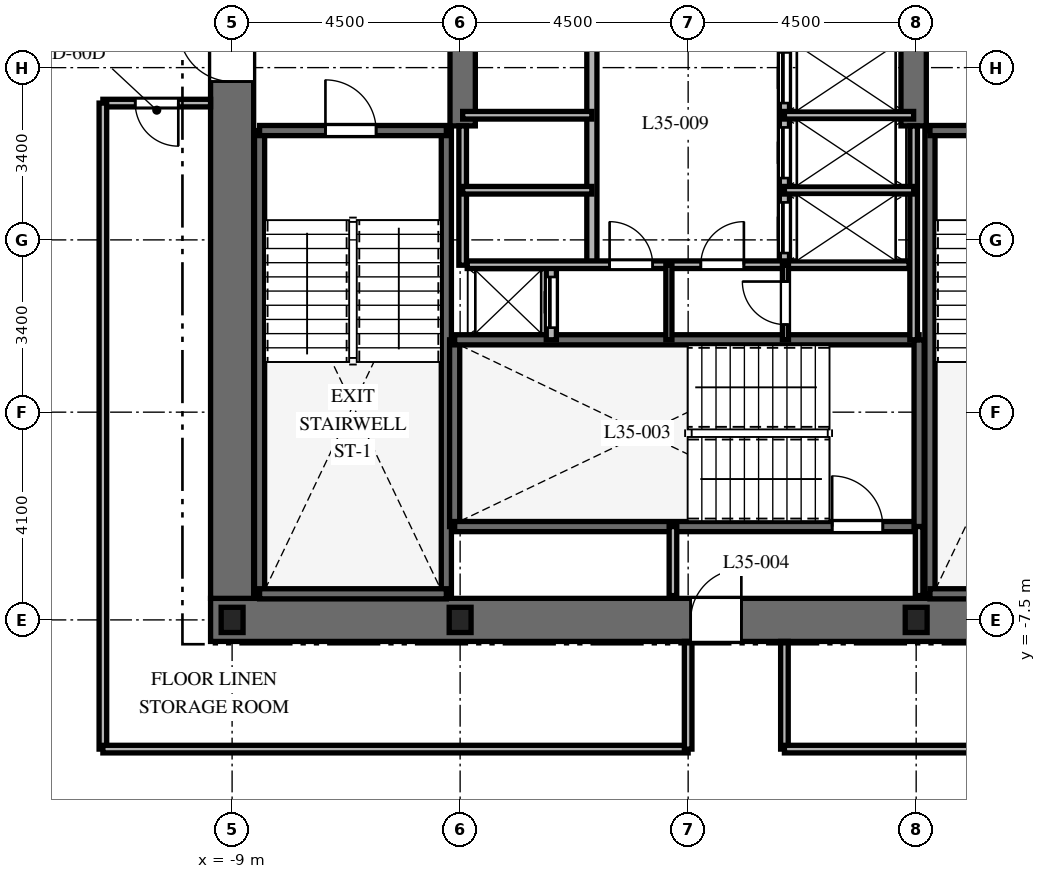
"""IFC4 building model, lengths in metres.
Left out: names, types, materials, properties, quantities, classifications, styles, units other than length and angle.
Written with IfcOpenShell. Run it as: python <this file> out.ifc"""

import sys

from ifc_helpers import new_model, si_unit, direction, frame, frame_2d, origin, origin_2d, place, context, subcontext, project, spatial, rectangle, i_section, extrude, element, fill, save


model = new_model("IFC4")
c1 = context("Model", 3, precision=1e-05, world=origin(), true_north=direction((0.0, 1.0)))
c2 = subcontext(c1, "Body", "Model", "MODEL_VIEW")
j1 = project(units=[si_unit("LENGTHUNIT", "METRE"), si_unit("PLANEANGLEUNIT", "RADIAN")], contexts=[c1])
p1 = place(None, origin())
s1 = spatial("IfcSite", under=j1, at=p1, CompositionType="ELEMENT")
p2 = place(p1, origin())
s2 = spatial("IfcBuilding", under=s1, at=p2, CompositionType="ELEMENT")
p3 = place(p2, frame((0.0, 0.0, 144.3)))
s3 = spatial("IfcBuildingStorey", under=s2, at=p3, CompositionType="ELEMENT", Elevation=144.3)
p4 = place(p3, frame((-9.425, -7.5, 0.0), z_axis=(0.0, 0.0, 1.0), x_axis=(1.0, 0.0, 0.0)))
e1 = element("IfcWall", 1, at=p4, inside=s3, PredefinedType="SHEAR", context=c2, shape_type="SweptSolid", body=[
    extrude(rectangle(XDim=18.85, YDim=0.85, at=frame_2d((9.425, 0.0))), origin(), (0.0, 0.0, 1.0), 3.7),
])
p5 = place(p4, frame((9.475, 0.0, 0.0)))
e2 = element("IfcOpeningElement", 2, at=p5, cuts=e1, PredefinedType="OPENING", context=c2, shape_type="SweptSolid", body=[
    extrude(rectangle(XDim=1.0, YDim=2.15, at=frame_2d((0.5, 1.075))), frame((0.0, 0.435, 0.0), z_axis=(0.0, -1.0, 0.0), x_axis=(1.0, 0.0, 0.0)), (0.0, 0.0, 1.0), 0.87),
])
p6 = place(p3, frame((-9.0, -7.075, 0.0), z_axis=(0.0, 0.0, 1.0), x_axis=(0.0, 1.0, 0.0)))
e3 = element("IfcWall", 3, at=p6, inside=s3, PredefinedType="SHEAR", context=c2, shape_type="SweptSolid", body=[
    extrude(rectangle(XDim=14.15, YDim=0.85, at=frame_2d((7.075, 0.0))), origin(), (0.0, 0.0, 1.0), 3.7),
])
p7 = place(p6, frame((10.2, 0.0, 0.0)))
e4 = element("IfcOpeningElement", 4, at=p7, cuts=e3, PredefinedType="OPENING", context=c2, shape_type="SweptSolid", body=[
    extrude(rectangle(XDim=1.05, YDim=2.15, at=frame_2d((0.525, 1.075))), frame((0.0, 0.435, 0.0), z_axis=(0.0, -1.0, 0.0), x_axis=(1.0, 0.0, 0.0)), (0.0, 0.0, 1.0), 0.87),
])
for number, where, z_axis, x_axis in (
    (5, (-4.45, 2.25, 0.0), (0.0, 0.0, 1.0), (0.0, 1.0, 0.0)),
    (6, (4.45, 2.25, 0.0), (0.0, 0.0, 1.0), (0.0, 1.0, 0.0)),
):
    element("IfcWall", number, at=place(p3, frame(where, z_axis=z_axis, x_axis=x_axis)), inside=s3, PredefinedType="SHEAR", context=c2, shape_type="SweptSolid", body=[
        extrude(rectangle(XDim=4.825, YDim=0.5, at=frame_2d((2.413, 0.0))), origin(), (0.0, 0.0, 1.0), 3.7),
    ])
for number, where, z_axis, x_axis in (
    (7, (-8.458, -6.985, 0.0), (0.0, 0.0, 1.0), (0.0, 1.0, 0.0)),
    (8, (-4.772, -6.985, 0.0), (0.0, 0.0, 1.0), (0.0, 1.0, 0.0)),
):
    element("IfcWall", number, at=place(p3, frame(where, z_axis=z_axis, x_axis=x_axis)), inside=s3, PredefinedType="SHEAR", context=c2, shape_type="SweptSolid", body=[
        extrude(rectangle(XDim=9.143, YDim=0.2, at=frame_2d((4.572, 0.0))), origin(), (0.0, 0.0, 1.0), 3.7),
    ])
p8 = place(p3, frame((-8.458, -6.985, 0.0), z_axis=(0.0, 0.0, 1.0), x_axis=(1.0, 0.0, 0.0)))
e9 = element("IfcWall", 9, at=p8, inside=s3, PredefinedType="SHEAR", context=c2, shape_type="SweptSolid", body=[
    extrude(rectangle(XDim=3.686, YDim=0.2, at=frame_2d((1.843, 0.0))), origin(), (0.0, 0.0, 1.0), 3.7),
])
p9 = place(p3, frame((-8.458, 2.158, 0.0), z_axis=(0.0, 0.0, 1.0), x_axis=(1.0, 0.0, 0.0)))
e10 = element("IfcWall", 10, at=p9, inside=s3, PredefinedType="SHEAR", context=c2, shape_type="SweptSolid", body=[
    extrude(rectangle(XDim=3.686, YDim=0.2, at=frame_2d((1.843, 0.0))), origin(), (0.0, 0.0, 1.0), 3.7),
])
p10 = place(p9, frame((1.3, 0.0, 0.0)))
e11 = element("IfcOpeningElement", 11, at=p10, cuts=e10, PredefinedType="OPENING", context=c2, shape_type="SweptSolid", body=[
    extrude(rectangle(XDim=1.0, YDim=2.15, at=frame_2d((0.5, 1.075))), frame((0.0, 0.11, 0.0), z_axis=(0.0, -1.0, 0.0), x_axis=(1.0, 0.0, 0.0)), (0.0, 0.0, 1.0), 0.22),
])
p11 = place(p3, frame((4.772, -6.985, 0.0), z_axis=(0.0, 0.0, 1.0), x_axis=(0.0, 1.0, 0.0)))
e12 = element("IfcWall", 12, at=p11, inside=s3, PredefinedType="SHEAR", context=c2, shape_type="SweptSolid", body=[
    extrude(rectangle(XDim=9.143, YDim=0.2, at=frame_2d((4.572, 0.0))), origin(), (0.0, 0.0, 1.0), 3.7),
])
p12 = place(p3, frame((4.772, -6.985, 0.0), z_axis=(0.0, 0.0, 1.0), x_axis=(1.0, 0.0, 0.0)))
e13 = element("IfcWall", 13, at=p12, inside=s3, PredefinedType="SHEAR", context=c2, shape_type="SweptSolid", body=[
    extrude(rectangle(XDim=3.686, YDim=0.2, at=frame_2d((1.843, 0.0))), origin(), (0.0, 0.0, 1.0), 3.7),
])
p13 = place(p3, frame((4.772, 2.158, 0.0), z_axis=(0.0, 0.0, 1.0), x_axis=(1.0, 0.0, 0.0)))
e14 = element("IfcWall", 14, at=p13, inside=s3, PredefinedType="SHEAR", context=c2, shape_type="SweptSolid", body=[
    extrude(rectangle(XDim=3.686, YDim=0.2, at=frame_2d((1.843, 0.0))), origin(), (0.0, 0.0, 1.0), 3.7),
])
p14 = place(p13, frame((1.35, 0.0, 0.0)))
e15 = element("IfcOpeningElement", 15, at=p14, cuts=e14, PredefinedType="OPENING", context=c2, shape_type="SweptSolid", body=[
    extrude(rectangle(XDim=1.0, YDim=2.15, at=frame_2d((0.5, 1.075))), frame((0.0, 0.11, 0.0), z_axis=(0.0, -1.0, 0.0), x_axis=(1.0, 0.0, 0.0)), (0.0, 0.0, 1.0), 0.22),
])
p15 = place(p3, frame((-4.608, -5.658, 0.0), z_axis=(0.0, 0.0, 1.0), x_axis=(0.0, 1.0, 0.0)))
e16 = element("IfcWall", 16, at=p15, inside=s3, PredefinedType="SHEAR", context=c2, shape_type="SweptSolid", body=[
    extrude(rectangle(XDim=3.686, YDim=0.2, at=frame_2d((1.843, 0.0))), origin(), (0.0, 0.0, 1.0), 3.7),
])
p16 = place(p3, frame((-4.608, -5.658, 0.0), z_axis=(0.0, 0.0, 1.0), x_axis=(1.0, 0.0, 0.0)))
e17 = element("IfcWall", 17, at=p16, inside=s3, PredefinedType="SHEAR", context=c2, shape_type="SweptSolid", body=[
    extrude(rectangle(XDim=9.166, YDim=0.2, at=frame_2d((4.583, 0.0))), origin(), (0.0, 0.0, 1.0), 3.7),
])
p17 = place(p16, frame((7.45, 0.0, 0.0)))
e18 = element("IfcOpeningElement", 18, at=p17, cuts=e17, PredefinedType="OPENING", context=c2, shape_type="SweptSolid", body=[
    extrude(rectangle(XDim=1.0, YDim=2.15, at=frame_2d((0.5, 1.075))), frame((0.0, 0.11, 0.0), z_axis=(0.0, -1.0, 0.0), x_axis=(1.0, 0.0, 0.0)), (0.0, 0.0, 1.0), 0.22),
])
p18 = place(p3, frame((-4.608, -1.972, 0.0), z_axis=(0.0, 0.0, 1.0), x_axis=(1.0, 0.0, 0.0)))
e19 = element("IfcWall", 19, at=p18, inside=s3, PredefinedType="SHEAR", context=c2, shape_type="SweptSolid", body=[
    extrude(rectangle(XDim=9.166, YDim=0.2, at=frame_2d((4.583, 0.0))), origin(), (0.0, 0.0, 1.0), 3.7),
])
p19 = place(p3, frame((4.558, -5.658, 0.0), z_axis=(0.0, 0.0, 1.0), x_axis=(0.0, 1.0, 0.0)))
e20 = element("IfcWall", 20, at=p19, inside=s3, PredefinedType="SHEAR", context=c2, shape_type="SweptSolid", body=[
    extrude(rectangle(XDim=3.686, YDim=0.2, at=frame_2d((1.843, 0.0))), origin(), (0.0, 0.0, 1.0), 3.7),
])
for number, where, z_axis, x_axis in (
    (21, (-9.0, -7.5, 0.0), (0.0, 0.0, 1.0), (1.0, 0.0, 0.0)),
    (22, (-4.5, -7.5, 0.0), (0.0, 0.0, 1.0), (1.0, 0.0, 0.0)),
    (23, (4.5, -7.5, 0.0), (0.0, 0.0, 1.0), (1.0, 0.0, 0.0)),
):
    element("IfcColumn", number, at=place(p3, frame(where, z_axis=z_axis, x_axis=x_axis)), inside=s3, PredefinedType="COLUMN", context=c2, shape_type="SweptSolid", body=[
        extrude(i_section(OverallWidth=0.432, OverallDepth=0.498, WebThickness=0.056, FlangeThickness=0.089, at=origin_2d()), origin(), (0.0, 0.0, 1.0), 3.7),
    ])
for number, where, z_axis, x_axis in (
    (24, (-0.3, -7.02, 0.0), (0.0, 0.0, 1.0), (0.0, 1.0, 0.0)),
    (25, (4.558, -7.02, 0.0), (0.0, 0.0, 1.0), (0.0, 1.0, 0.0)),
):
    element("IfcWall", number, at=place(p3, frame(where, z_axis=z_axis, x_axis=x_axis)), inside=s3, PredefinedType="PARTITIONING", context=c2, shape_type="SweptSolid", body=[
        extrude(rectangle(XDim=1.362, YDim=0.15, at=frame_2d((0.681, 0.0))), origin(), (0.0, 0.0, 1.0), 3.4),
    ])
p20 = place(p3, frame((-2.7, -1.972, 0.0), z_axis=(0.0, 0.0, 1.0), x_axis=(0.0, 1.0, 0.0)))
e26 = element("IfcWall", 26, at=p20, inside=s3, PredefinedType="PARTITIONING", context=c2, shape_type="SweptSolid", body=[
    extrude(rectangle(XDim=1.472, YDim=0.2, at=frame_2d((0.736, 0.0))), origin(), (0.0, 0.0, 1.0), 3.4),
])
p21 = place(p20, frame((0.24, 0.0, 0.0)))
e27 = element("IfcOpeningElement", 27, at=p21, cuts=e26, PredefinedType="OPENING", context=c2, shape_type="SweptSolid", body=[
    extrude(rectangle(XDim=1.0, YDim=2.2, at=frame_2d((0.5, 1.1))), frame((0.0, 0.11, 0.0), z_axis=(0.0, -1.0, 0.0), x_axis=(1.0, 0.0, 0.0)), (0.0, 0.0, 1.0), 0.22),
])
p22 = place(p3, frame((-4.45, -0.5, 0.0), z_axis=(0.0, 0.0, 1.0), x_axis=(0.0, 1.0, 0.0)))
e28 = element("IfcWall", 28, at=p22, inside=s3, PredefinedType="PARTITIONING", context=c2, shape_type="SweptSolid", body=[
    extrude(rectangle(XDim=2.75, YDim=0.15, at=frame_2d((1.375, 0.0))), origin(), (0.0, 0.0, 1.0), 3.4),
])
p23 = place(p3, frame((4.45, -1.972, 0.0), z_axis=(0.0, 0.0, 1.0), x_axis=(0.0, 1.0, 0.0)))
e29 = element("IfcWall", 29, at=p23, inside=s3, PredefinedType="PARTITIONING", context=c2, shape_type="SweptSolid", body=[
    extrude(rectangle(XDim=4.222, YDim=0.15, at=frame_2d((2.111, 0.0))), origin(), (0.0, 0.0, 1.0), 3.4),
])
p24 = place(p3, frame((-1.9, -0.5, 0.0), z_axis=(0.0, 0.0, 1.0), x_axis=(0.0, 1.0, 0.0)))
e30 = element("IfcWall", 30, at=p24, inside=s3, PredefinedType="PARTITIONING", context=c2, shape_type="SweptSolid", body=[
    extrude(rectangle(XDim=4.44, YDim=0.2, at=frame_2d((2.22, 0.0))), origin(), (0.0, 0.0, 1.0), 3.4),
])
for number, where, z_axis, x_axis in (
    (31, (-4.45, 0.98, 0.0), (0.0, 0.0, 1.0), (1.0, 0.0, 0.0)),
    (32, (-4.45, 2.46, 0.0), (0.0, 0.0, 1.0), (1.0, 0.0, 0.0)),
):
    element("IfcWall", number, at=place(p3, frame(where, z_axis=z_axis, x_axis=x_axis)), inside=s3, PredefinedType="PARTITIONING", context=c2, shape_type="SweptSolid", body=[
        extrude(rectangle(XDim=2.55, YDim=0.15, at=frame_2d((1.275, 0.0))), origin(), (0.0, 0.0, 1.0), 3.4),
    ])
p25 = place(p3, frame((1.9, -0.5, 0.0), z_axis=(0.0, 0.0, 1.0), x_axis=(0.0, 1.0, 0.0)))
e33 = element("IfcWall", 33, at=p25, inside=s3, PredefinedType="PARTITIONING", context=c2, shape_type="SweptSolid", body=[
    extrude(rectangle(XDim=4.44, YDim=0.2, at=frame_2d((2.22, 0.0))), origin(), (0.0, 0.0, 1.0), 3.4),
])
p26 = place(p25, frame((0.24, 0.0, 0.0)))
e34 = element("IfcOpeningElement", 34, at=p26, cuts=e33, PredefinedType="OPENING", context=c2, shape_type="SweptSolid", body=[
    extrude(rectangle(XDim=1.0, YDim=2.2, at=frame_2d((0.5, 1.1))), frame((0.0, 0.11, 0.0), z_axis=(0.0, -1.0, 0.0), x_axis=(1.0, 0.0, 0.0)), (0.0, 0.0, 1.0), 0.22),
])
p27 = place(p25, frame((1.72, 0.0, 0.0)))
e35 = element("IfcOpeningElement", 35, at=p27, cuts=e33, PredefinedType="OPENING", context=c2, shape_type="SweptSolid", body=[
    extrude(rectangle(XDim=1.0, YDim=2.2, at=frame_2d((0.5, 1.1))), frame((0.0, 0.11, 0.0), z_axis=(0.0, -1.0, 0.0), x_axis=(1.0, 0.0, 0.0)), (0.0, 0.0, 1.0), 0.22),
])
p28 = place(p25, frame((3.2, 0.0, 0.0)))
e36 = element("IfcOpeningElement", 36, at=p28, cuts=e33, PredefinedType="OPENING", context=c2, shape_type="SweptSolid", body=[
    extrude(rectangle(XDim=1.0, YDim=2.2, at=frame_2d((0.5, 1.1))), frame((0.0, 0.11, 0.0), z_axis=(0.0, -1.0, 0.0), x_axis=(1.0, 0.0, 0.0)), (0.0, 0.0, 1.0), 0.22),
])
for number, where, z_axis, x_axis in (
    (37, (1.9, 0.98, 0.0), (0.0, 0.0, 1.0), (1.0, 0.0, 0.0)),
    (38, (1.9, 2.46, 0.0), (0.0, 0.0, 1.0), (1.0, 0.0, 0.0)),
):
    element("IfcWall", number, at=place(p3, frame(where, z_axis=z_axis, x_axis=x_axis)), inside=s3, PredefinedType="PARTITIONING", context=c2, shape_type="SweptSolid", body=[
        extrude(rectangle(XDim=2.55, YDim=0.15, at=frame_2d((1.275, 0.0))), origin(), (0.0, 0.0, 1.0), 3.4),
    ])
p29 = place(p3, frame((-4.36, -0.49, 0.0), z_axis=(0.0, 0.0, 1.0), x_axis=(1.0, 0.0, 0.0)))
e39 = element("IfcWall", 39, at=p29, inside=s3, PredefinedType="PARTITIONING", context=c2, shape_type="SweptSolid", body=[
    extrude(rectangle(XDim=8.72, YDim=0.15, at=frame_2d((4.36, 0.0))), origin(), (0.0, 0.0, 1.0), 3.4),
])
p30 = place(p29, frame((2.81, 0.0, 0.0)))
e40 = element("IfcOpeningElement", 40, at=p30, cuts=e39, PredefinedType="OPENING", context=c2, shape_type="SweptSolid", body=[
    extrude(rectangle(XDim=0.85, YDim=2.03, at=frame_2d((0.425, 1.015))), frame((0.0, 0.085, 0.0), z_axis=(0.0, -1.0, 0.0), x_axis=(1.0, 0.0, 0.0)), (0.0, 0.0, 1.0), 0.17),
])
p31 = place(p29, frame((4.61, 0.0, 0.0)))
e41 = element("IfcOpeningElement", 41, at=p31, cuts=e39, PredefinedType="OPENING", context=c2, shape_type="SweptSolid", body=[
    extrude(rectangle(XDim=0.85, YDim=2.03, at=frame_2d((0.425, 1.015))), frame((0.0, 0.085, 0.0), z_axis=(0.0, -1.0, 0.0), x_axis=(1.0, 0.0, 0.0)), (0.0, 0.0, 1.0), 0.17),
])
p32 = place(p3, frame((-0.38, -1.972, 0.0), z_axis=(0.0, 0.0, 1.0), x_axis=(0.0, 1.0, 0.0)))
e42 = element("IfcWall", 42, at=p32, inside=s3, PredefinedType="PARTITIONING", context=c2, shape_type="SweptSolid", body=[
    extrude(rectangle(XDim=1.472, YDim=0.12, at=frame_2d((0.736, 0.0))), origin(), (0.0, 0.0, 1.0), 3.4),
])
p33 = place(p3, frame((1.92, -1.972, 0.0), z_axis=(0.0, 0.0, 1.0), x_axis=(0.0, 1.0, 0.0)))
e43 = element("IfcWall", 43, at=p33, inside=s3, PredefinedType="PARTITIONING", context=c2, shape_type="SweptSolid", body=[
    extrude(rectangle(XDim=1.472, YDim=0.12, at=frame_2d((0.736, 0.0))), origin(), (0.0, 0.0, 1.0), 3.4),
])
p34 = place(p33, frame((0.3, 0.0, 0.0)))
e44 = element("IfcOpeningElement", 44, at=p34, cuts=e43, PredefinedType="OPENING", context=c2, shape_type="SweptSolid", body=[
    extrude(rectangle(XDim=0.85, YDim=2.03, at=frame_2d((0.425, 1.015))), frame((0.0, 0.07, 0.0), z_axis=(0.0, -1.0, 0.0), x_axis=(1.0, 0.0, 0.0)), (0.0, 0.0, 1.0), 0.14),
])
p35 = place(p3, frame((-9.425, 2.7, 0.0), z_axis=(0.0, 0.0, 1.0), x_axis=(-1.0, 0.0, 0.0)))
e45 = element("IfcWall", 45, at=p35, inside=s3, PredefinedType="PARTITIONING", context=c2, shape_type="SweptSolid", body=[
    extrude(rectangle(XDim=2.125, YDim=0.15, at=frame_2d((1.062, 0.0))), origin(), (0.0, 0.0, 1.0), 3.4),
])
p36 = place(p35, frame((0.637, 0.0, 0.0)))
e46 = element("IfcOpeningElement", 46, at=p36, cuts=e45, PredefinedType="OPENING", context=c2, shape_type="SweptSolid", body=[
    extrude(rectangle(XDim=0.85, YDim=2.03, at=frame_2d((0.425, 1.015))), frame((0.0, 0.085, 0.0), z_axis=(0.0, -1.0, 0.0), x_axis=(1.0, 0.0, 0.0)), (0.0, 0.0, 1.0), 0.17),
])
p37 = place(p3, frame((-11.55, 2.7, 0.0), z_axis=(0.0, 0.0, 1.0), x_axis=(0.0, -1.0, 0.0)))
e47 = element("IfcWall", 47, at=p37, inside=s3, PredefinedType="PARTITIONING", context=c2, shape_type="SweptSolid", body=[
    extrude(rectangle(XDim=12.75, YDim=0.15, at=frame_2d((6.375, 0.0))), origin(), (0.0, 0.0, 1.0), 2.84),
])
p38 = place(p3, frame((-11.55, -10.05, 0.0), z_axis=(0.0, 0.0, 1.0), x_axis=(1.0, 0.0, 0.0)))
e48 = element("IfcWall", 48, at=p38, inside=s3, PredefinedType="PARTITIONING", context=c2, shape_type="SweptSolid", body=[
    extrude(rectangle(XDim=11.55, YDim=0.15, at=frame_2d((5.775, 0.0))), origin(), (0.0, 0.0, 1.0), 2.84),
])
for number, where, z_axis, x_axis in (
    (49, (0.0, -10.05, 0.0), (0.0, 0.0, 1.0), (0.0, 1.0, 0.0)),
    (50, (1.9, -7.925, 0.0), (0.0, 0.0, 1.0), (0.0, -1.0, 0.0)),
):
    element("IfcWall", number, at=place(p3, frame(where, z_axis=z_axis, x_axis=x_axis)), inside=s3, PredefinedType="PARTITIONING", context=c2, shape_type="SweptSolid", body=[
        extrude(rectangle(XDim=2.125, YDim=0.15, at=frame_2d((1.062, 0.0))), origin(), (0.0, 0.0, 1.0), 3.4),
    ])
p39 = place(p3, frame((1.9, -10.05, 0.0), z_axis=(0.0, 0.0, 1.0), x_axis=(1.0, 0.0, 0.0)))
e51 = element("IfcWall", 51, at=p39, inside=s3, PredefinedType="PARTITIONING", context=c2, shape_type="SweptSolid", body=[
    extrude(rectangle(XDim=9.65, YDim=0.15, at=frame_2d((4.825, 0.0))), origin(), (0.0, 0.0, 1.0), 2.84),
])
p40 = place(p10, origin())
e52 = element("IfcDoor", 52, at=p40, inside=s3, OperationType="SINGLE_SWING_LEFT", PredefinedType="DOOR", context=c2, shape_type="SweptSolid", body=[
    extrude(rectangle(XDim=1.0, YDim=2.15, at=frame_2d((0.5, 1.075))), frame((0.0, 0.025, 0.0), z_axis=(0.0, -1.0, 0.0), x_axis=(1.0, 0.0, 0.0)), (0.0, 0.0, 1.0), 0.05),
])
fill(e11, e52)
p41 = place(p17, origin())
e53 = element("IfcDoor", 53, at=p41, inside=s3, OperationType="SINGLE_SWING_LEFT", PredefinedType="DOOR", context=c2, shape_type="SweptSolid", body=[
    extrude(rectangle(XDim=1.0, YDim=2.15, at=frame_2d((0.5, 1.075))), frame((0.0, 0.025, 0.0), z_axis=(0.0, -1.0, 0.0), x_axis=(1.0, 0.0, 0.0)), (0.0, 0.0, 1.0), 0.05),
])
fill(e18, e53)
p42 = place(p5, origin())
e54 = element("IfcDoor", 54, at=p42, inside=s3, OperationType="SINGLE_SWING_RIGHT", PredefinedType="DOOR", context=c2, shape_type="SweptSolid", body=[
    extrude(rectangle(XDim=1.0, YDim=2.15, at=frame_2d((0.5, 1.075))), frame((0.0, 0.025, 0.0), z_axis=(0.0, -1.0, 0.0), x_axis=(1.0, 0.0, 0.0)), (0.0, 0.0, 1.0), 0.05),
])
fill(e2, e54)
p43 = place(p7, origin())
e55 = element("IfcDoor", 55, at=p43, inside=s3, OperationType="SINGLE_SWING_RIGHT", PredefinedType="DOOR", context=c2, shape_type="SweptSolid", body=[
    extrude(rectangle(XDim=1.05, YDim=2.15, at=frame_2d((0.525, 1.075))), frame((0.0, 0.025, 0.0), z_axis=(0.0, -1.0, 0.0), x_axis=(1.0, 0.0, 0.0)), (0.0, 0.0, 1.0), 0.05),
])
fill(e4, e55)
p44 = place(p21, origin())
e56 = element("IfcDoor", 56, at=p44, inside=s3, OperationType="SLIDING_TO_LEFT", PredefinedType="DOOR", context=c2, shape_type="SweptSolid", body=[
    extrude(rectangle(XDim=1.0, YDim=2.2, at=frame_2d((0.5, 1.1))), frame((0.0, 0.025, 0.0), z_axis=(0.0, -1.0, 0.0), x_axis=(1.0, 0.0, 0.0)), (0.0, 0.0, 1.0), 0.05),
])
fill(e27, e56)
p45 = place(p26, origin())
e57 = element("IfcDoor", 57, at=p45, inside=s3, OperationType="SLIDING_TO_RIGHT", PredefinedType="DOOR", context=c2, shape_type="SweptSolid", body=[
    extrude(rectangle(XDim=1.0, YDim=2.2, at=frame_2d((0.5, 1.1))), frame((0.0, 0.025, 0.0), z_axis=(0.0, -1.0, 0.0), x_axis=(1.0, 0.0, 0.0)), (0.0, 0.0, 1.0), 0.05),
])
fill(e34, e57)
p46 = place(p27, origin())
e58 = element("IfcDoor", 58, at=p46, inside=s3, OperationType="SLIDING_TO_RIGHT", PredefinedType="DOOR", context=c2, shape_type="SweptSolid", body=[
    extrude(rectangle(XDim=1.0, YDim=2.2, at=frame_2d((0.5, 1.1))), frame((0.0, 0.025, 0.0), z_axis=(0.0, -1.0, 0.0), x_axis=(1.0, 0.0, 0.0)), (0.0, 0.0, 1.0), 0.05),
])
fill(e35, e58)
p47 = place(p28, origin())
e59 = element("IfcDoor", 59, at=p47, inside=s3, OperationType="SLIDING_TO_RIGHT", PredefinedType="DOOR", context=c2, shape_type="SweptSolid", body=[
    extrude(rectangle(XDim=1.0, YDim=2.2, at=frame_2d((0.5, 1.1))), frame((0.0, 0.025, 0.0), z_axis=(0.0, -1.0, 0.0), x_axis=(1.0, 0.0, 0.0)), (0.0, 0.0, 1.0), 0.05),
])
fill(e36, e59)
p48 = place(p30, origin())
e60 = element("IfcDoor", 60, at=p48, inside=s3, OperationType="SINGLE_SWING_LEFT", PredefinedType="DOOR", context=c2, shape_type="SweptSolid", body=[
    extrude(rectangle(XDim=0.85, YDim=2.03, at=frame_2d((0.425, 1.015))), frame((0.0, 0.025, 0.0), z_axis=(0.0, -1.0, 0.0), x_axis=(1.0, 0.0, 0.0)), (0.0, 0.0, 1.0), 0.05),
])
fill(e40, e60)
p49 = place(p31, origin())
e61 = element("IfcDoor", 61, at=p49, inside=s3, OperationType="SINGLE_SWING_RIGHT", PredefinedType="DOOR", context=c2, shape_type="SweptSolid", body=[
    extrude(rectangle(XDim=0.85, YDim=2.03, at=frame_2d((0.425, 1.015))), frame((0.0, 0.025, 0.0), z_axis=(0.0, -1.0, 0.0), x_axis=(1.0, 0.0, 0.0)), (0.0, 0.0, 1.0), 0.05),
])
fill(e41, e61)
p50 = place(p34, origin())
e62 = element("IfcDoor", 62, at=p50, inside=s3, OperationType="SINGLE_SWING_RIGHT", PredefinedType="DOOR", context=c2, shape_type="SweptSolid", body=[
    extrude(rectangle(XDim=0.85, YDim=2.03, at=frame_2d((0.425, 1.015))), frame((0.0, 0.025, 0.0), z_axis=(0.0, -1.0, 0.0), x_axis=(1.0, 0.0, 0.0)), (0.0, 0.0, 1.0), 0.05),
])
fill(e44, e62)
p51 = place(p36, origin())
e63 = element("IfcDoor", 63, at=p51, inside=s3, OperationType="SINGLE_SWING_LEFT", PredefinedType="DOOR", context=c2, shape_type="SweptSolid", body=[
    extrude(rectangle(XDim=0.85, YDim=2.03, at=frame_2d((0.425, 1.015))), frame((0.0, 0.025, 0.0), z_axis=(0.0, -1.0, 0.0), x_axis=(1.0, 0.0, 0.0)), (0.0, 0.0, 1.0), 0.05),
])
fill(e46, e63)
save(model, sys.argv[1])
